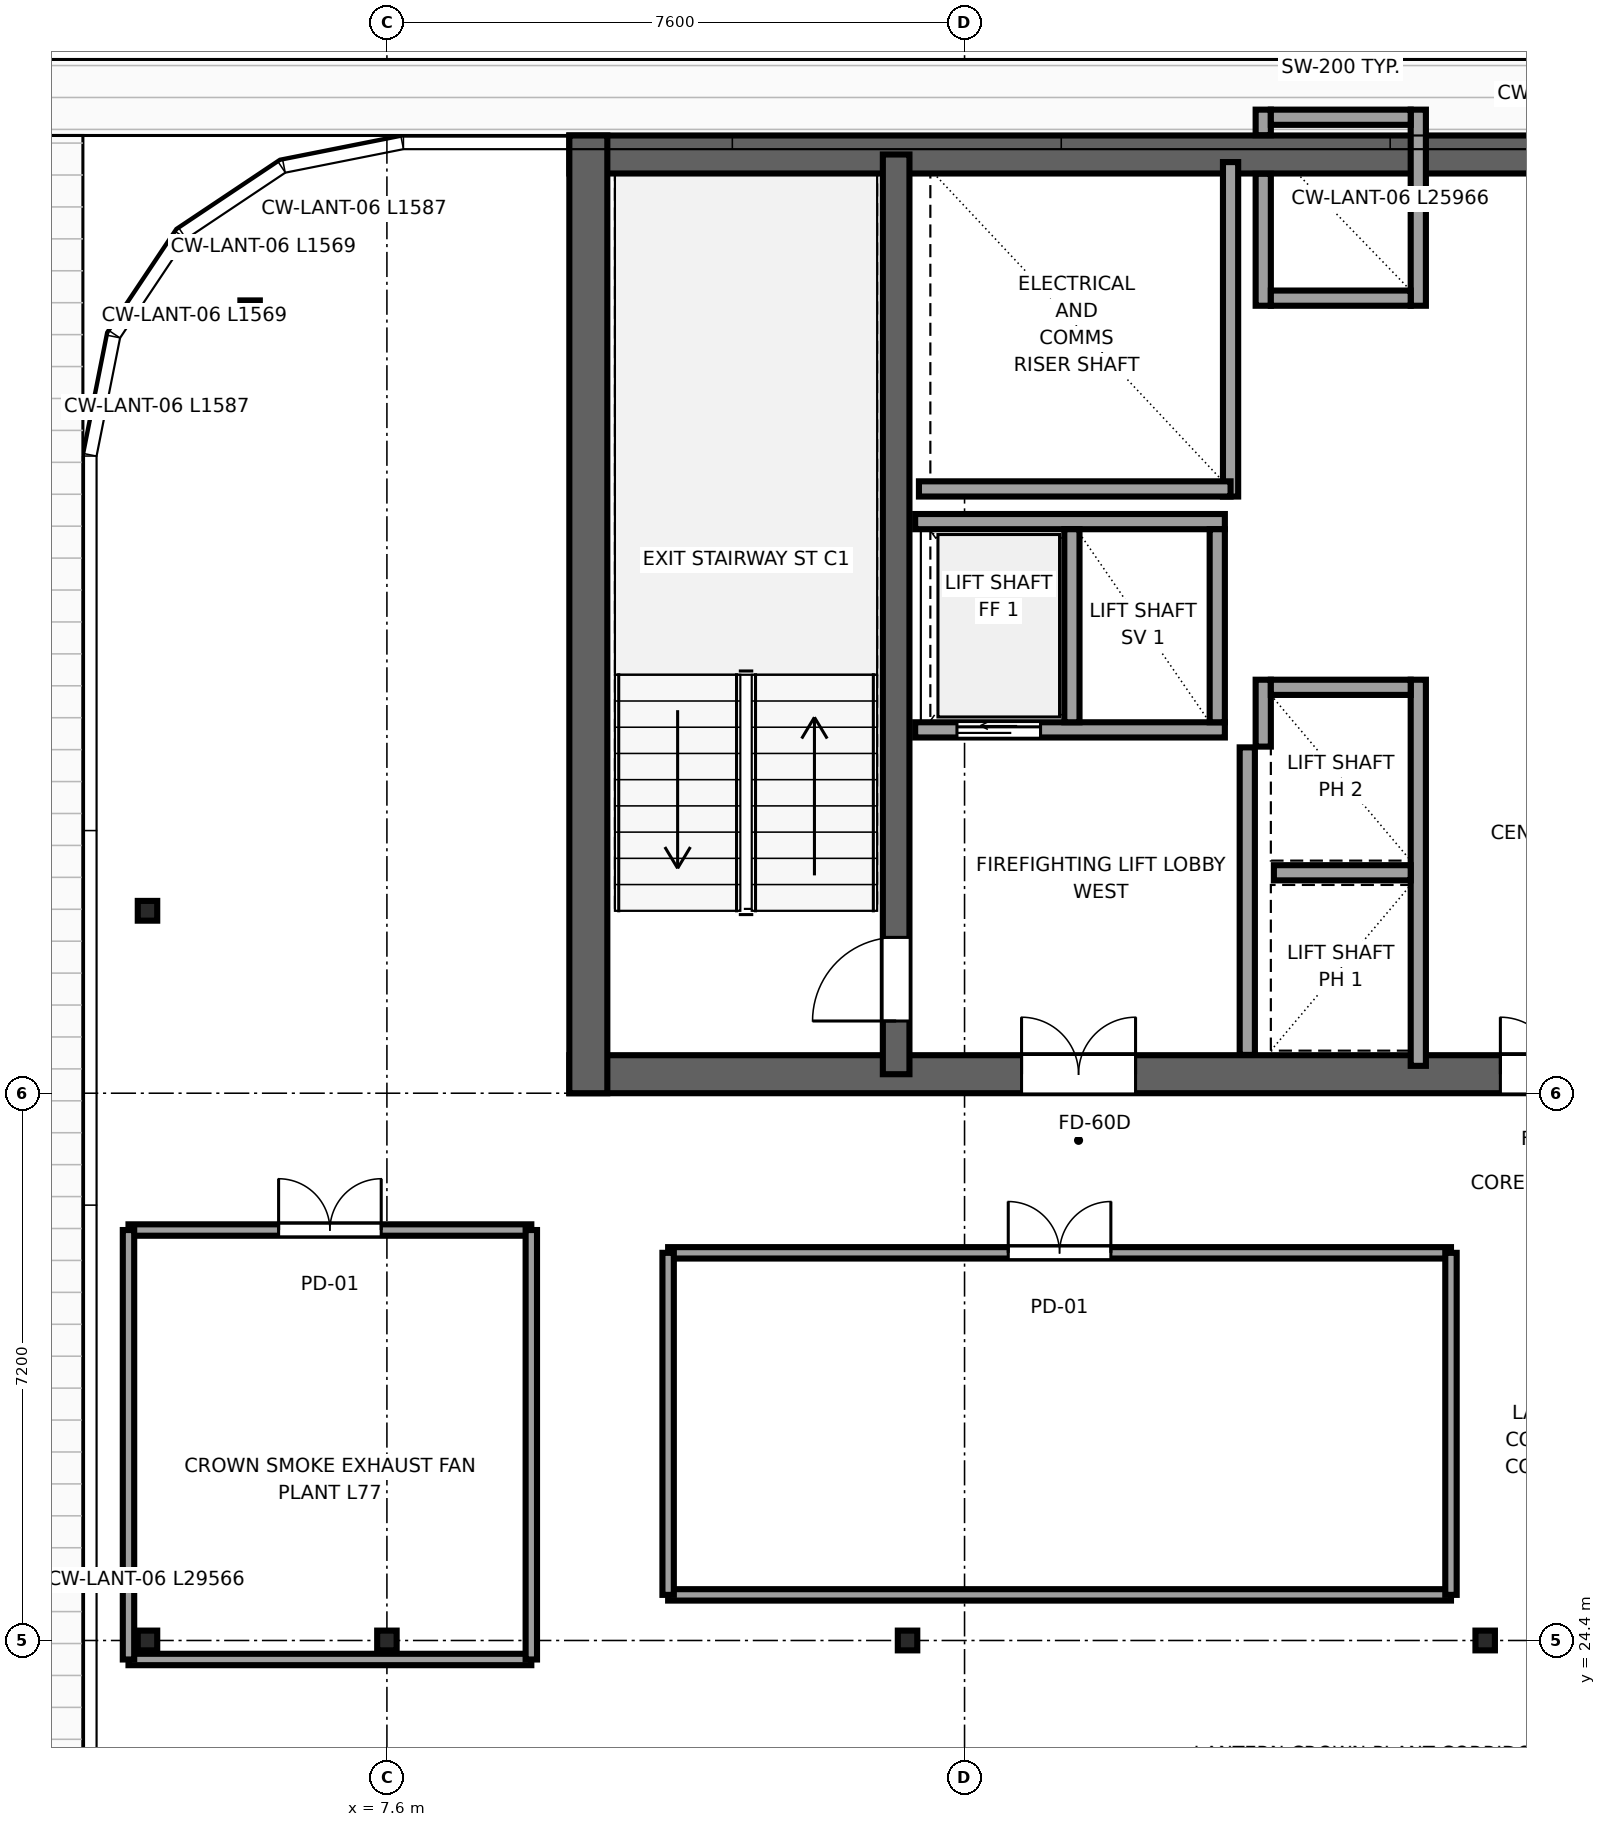
"""IFC4 building model, lengths in metres.
Left out: names, types, materials, properties, quantities, classifications, styles, units other than length and angle.
Written with IfcOpenShell. Run it as: python <this file> out.ifc"""

import sys

from ifc_helpers import new_model, si_unit, direction, frame, frame_2d, origin, origin_2d, place, context, subcontext, project, spatial, rectangle, i_section, extrude, source, transform, mapped, element, fill, save


model = new_model("IFC4")
c1 = context("Model", 3, precision=1e-05, world=origin(), true_north=direction((0.0, 1.0)))
c2 = subcontext(c1, "Body", "Model", "MODEL_VIEW")
j1 = project(units=[si_unit("LENGTHUNIT", "METRE"), si_unit("PLANEANGLEUNIT", "RADIAN")], contexts=[c1])
p1 = place(None, origin())
s1 = spatial("IfcSite", under=j1, at=p1, CompositionType="ELEMENT")
p2 = place(p1, origin())
s2 = spatial("IfcBuilding", under=s1, at=p2, CompositionType="ELEMENT")
p3 = place(p2, frame((0.0, 0.0, 290.95)))
s3 = spatial("IfcBuildingStorey", under=s2, at=p3, CompositionType="ELEMENT", Elevation=290.95)
p4 = place(p3, frame((10.0, 31.85, 0.0), z_axis=(0.0, 0.0, 1.0), x_axis=(1.0, 0.0, 0.0)))
e1 = element("IfcWall", 1, at=p4, inside=s3, PredefinedType="SHEAR", context=c2, shape_type="SweptSolid", body=[
    extrude(rectangle(XDim=26.0, YDim=0.5, at=frame_2d((13.0, 0.0))), origin(), (0.0, 0.0, 1.0), 3.8),
])
p5 = place(p4, frame((7.45, 0.0, 0.0), z_axis=(0.0, 0.0, 1.0), x_axis=(-1.0, 0.0, 0.0)))
e2 = element("IfcOpeningElement", 2, at=p5, cuts=e1, PredefinedType="OPENING", context=c2, shape_type="SweptSolid", body=[
    extrude(rectangle(XDim=1.5, YDim=2.04, at=frame_2d((0.75, 1.02))), frame((0.0, 0.26, 0.0), z_axis=(0.0, -1.0, 0.0), x_axis=(1.0, 0.0, 0.0)), (0.0, 0.0, 1.0), 0.52),
])
p6 = place(p4, frame((13.75, 0.0, 0.0), z_axis=(0.0, 0.0, 1.0), x_axis=(-1.0, 0.0, 0.0)))
e3 = element("IfcOpeningElement", 3, at=p6, cuts=e1, PredefinedType="OPENING", context=c2, shape_type="SweptSolid", body=[
    extrude(rectangle(XDim=1.5, YDim=2.04, at=frame_2d((0.75, 1.02))), frame((0.0, 0.26, 0.0), z_axis=(0.0, -1.0, 0.0), x_axis=(1.0, 0.0, 0.0)), (0.0, 0.0, 1.0), 0.52),
])
p7 = place(p4, frame((20.05, 0.0, 0.0), z_axis=(0.0, 0.0, 1.0), x_axis=(-1.0, 0.0, 0.0)))
e4 = element("IfcOpeningElement", 4, at=p7, cuts=e1, PredefinedType="OPENING", context=c2, shape_type="SweptSolid", body=[
    extrude(rectangle(XDim=1.5, YDim=2.04, at=frame_2d((0.75, 1.02))), frame((0.0, 0.26, 0.0), z_axis=(0.0, -1.0, 0.0), x_axis=(1.0, 0.0, 0.0)), (0.0, 0.0, 1.0), 0.52),
])
p8 = place(p3, frame((10.0, 43.95, 0.0), z_axis=(0.0, 0.0, 1.0), x_axis=(1.0, 0.0, 0.0)))
e5 = element("IfcWall", 5, at=p8, inside=s3, PredefinedType="SHEAR", context=c2, shape_type="SweptSolid", body=[
    extrude(rectangle(XDim=26.0, YDim=0.5, at=frame_2d((13.0, 0.0))), origin(), (0.0, 0.0, 1.0), 3.8),
])
p9 = place(p3, frame((10.25, 31.6, 0.0), z_axis=(0.0, 0.0, 1.0), x_axis=(0.0, 1.0, 0.0)))
e6 = element("IfcWall", 6, at=p9, inside=s3, PredefinedType="SHEAR", context=c2, shape_type="SweptSolid", body=[
    extrude(rectangle(XDim=12.6, YDim=0.5, at=frame_2d((6.3, 0.0))), origin(), (0.0, 0.0, 1.0), 3.8),
])
p10 = place(p3, frame((14.3, 31.85, 0.0), z_axis=(0.0, 0.0, 1.0), x_axis=(0.0, 1.0, 0.0)))
e7 = element("IfcWall", 7, at=p10, inside=s3, PredefinedType="SHEAR", context=c2, shape_type="SweptSolid", body=[
    extrude(rectangle(XDim=12.1, YDim=0.35, at=frame_2d((6.05, 0.0))), origin(), (0.0, 0.0, 1.0), 3.8),
])
p11 = place(p10, frame((0.7, 0.0, 0.0)))
e8 = element("IfcOpeningElement", 8, at=p11, cuts=e7, PredefinedType="OPENING", context=c2, shape_type="SweptSolid", body=[
    extrude(rectangle(XDim=1.1, YDim=2.12, at=frame_2d((0.55, 1.06))), frame((0.0, 0.185, 0.0), z_axis=(0.0, -1.0, 0.0), x_axis=(1.0, 0.0, 0.0)), (0.0, 0.0, 1.0), 0.37),
])
m1 = source(origin(), c2, "Body", "SweptSolid", [
    extrude(i_section(OverallWidth=0.256, OverallDepth=0.26, WebThickness=0.01, FlangeThickness=0.017, FilletRadius=0.014, at=origin_2d()), origin(), (0.0, 0.0, 1.0), 3.8),
])
for number, where, z_axis, x_axis in (
    (9, (4.45, 24.4, 0.0), (0.0, 0.0, 1.0), (1.0, 0.0, 0.0)),
    (10, (7.6, 24.4, 0.0), (0.0, 0.0, 1.0), (1.0, 0.0, 0.0)),
    (11, (14.45, 24.4, 0.0), (0.0, 0.0, 1.0), (1.0, 0.0, 0.0)),
    (12, (22.05, 24.4, 0.0), (0.0, 0.0, 1.0), (1.0, 0.0, 0.0)),
    (13, (5.8, 41.9, 0.0), (0.0, 0.0, 1.0), (1.0, 0.0, 0.0)),
    (14, (4.45, 34.0, 0.0), (0.0, 0.0, 1.0), (1.0, 0.0, 0.0)),
):
    element("IfcColumn", number, at=place(p3, frame(where, z_axis=z_axis, x_axis=x_axis)), inside=s3, PredefinedType="COLUMN", context=c2, shape_type="MappedRepresentation", body=[
        mapped(m1, transform((0.0, 0.0, 0.0), x_axis=(1.0, 0.0, 0.0), y_axis=(0.0, 1.0, 0.0), z_axis=(0.0, 0.0, 1.0), scale=1.0)),
    ])
p12 = place(p3, frame((18.7, 39.45, 0.0), z_axis=(0.0, 0.0, 1.0), x_axis=(0.0, 1.0, 0.0)))
e15 = element("IfcWall", 15, at=p12, inside=s3, PredefinedType="SOLIDWALL", context=c2, shape_type="SweptSolid", body=[
    extrude(rectangle(XDim=4.4, YDim=0.2, at=frame_2d((2.2, 0.0))), origin(), (0.0, 0.0, 1.0), 3.58),
])
p13 = place(p3, frame((14.6, 39.55, 0.0), z_axis=(0.0, 0.0, 1.0), x_axis=(1.0, 0.0, 0.0)))
e16 = element("IfcWall", 16, at=p13, inside=s3, PredefinedType="SOLIDWALL", context=c2, shape_type="SweptSolid", body=[
    extrude(rectangle(XDim=4.1, YDim=0.2, at=frame_2d((2.05, 0.0))), origin(), (0.0, 0.0, 1.0), 3.58),
])
p14 = place(p3, frame((18.92, 32.104, 0.0), z_axis=(0.0, 0.0, 1.0), x_axis=(0.0, 1.0, 0.0)))
e17 = element("IfcWall", 17, at=p14, inside=s3, PredefinedType="SOLIDWALL", context=c2, shape_type="SweptSolid", body=[
    extrude(rectangle(XDim=4.046, YDim=0.2, at=frame_2d((2.023, 0.0))), origin(), (0.0, 0.0, 1.0), 3.58),
])
p15 = place(p3, frame((21.17, 31.96, 0.0), z_axis=(0.0, 0.0, 1.0), x_axis=(0.0, 1.0, 0.0)))
e18 = element("IfcWall", 18, at=p15, inside=s3, PredefinedType="SOLIDWALL", context=c2, shape_type="SweptSolid", body=[
    extrude(rectangle(XDim=5.08, YDim=0.2, at=frame_2d((2.54, 0.0))), origin(), (0.0, 0.0, 1.0), 3.58),
])
p16 = place(p3, frame((19.13, 36.16, 0.0), z_axis=(0.0, 0.0, 1.0), x_axis=(0.0, 1.0, 0.0)))
e19 = element("IfcWall", 19, at=p16, inside=s3, PredefinedType="SOLIDWALL", context=c2, shape_type="SweptSolid", body=[
    extrude(rectangle(XDim=0.88, YDim=0.2, at=frame_2d((0.44, 0.0))), origin(), (0.0, 0.0, 1.0), 3.58),
])
p17 = place(p3, frame((19.23, 36.94, 0.0), z_axis=(0.0, 0.0, 1.0), x_axis=(1.0, 0.0, 0.0)))
e20 = element("IfcWall", 20, at=p17, inside=s3, PredefinedType="SOLIDWALL", context=c2, shape_type="SweptSolid", body=[
    extrude(rectangle(XDim=1.84, YDim=0.2, at=frame_2d((0.92, 0.0))), origin(), (0.0, 0.0, 1.0), 3.58),
])
p18 = place(p3, frame((19.27, 34.5, 0.0), z_axis=(0.0, 0.0, 1.0), x_axis=(1.0, 0.0, 0.0)))
e21 = element("IfcWall", 21, at=p18, inside=s3, PredefinedType="SOLIDWALL", context=c2, shape_type="SweptSolid", body=[
    extrude(rectangle(XDim=1.8, YDim=0.2, at=frame_2d((0.9, 0.0))), origin(), (0.0, 0.0, 1.0), 3.58),
])
p19 = place(p3, frame((21.17, 41.96, 0.0), z_axis=(0.0, 0.0, 1.0), x_axis=(0.0, 1.0, 0.0)))
e22 = element("IfcWall", 22, at=p19, inside=s3, PredefinedType="SOLIDWALL", context=c2, shape_type="SweptSolid", body=[
    extrude(rectangle(XDim=2.58, YDim=0.2, at=frame_2d((1.29, 0.0))), origin(), (0.0, 0.0, 1.0), 3.58),
])
p20 = place(p3, frame((19.13, 41.96, 0.0), z_axis=(0.0, 0.0, 1.0), x_axis=(0.0, 1.0, 0.0)))
e23 = element("IfcWall", 23, at=p20, inside=s3, PredefinedType="SOLIDWALL", context=c2, shape_type="SweptSolid", body=[
    extrude(rectangle(XDim=1.736, YDim=0.2, at=frame_2d((0.868, 0.0))), origin(), (0.0, 0.0, 1.0), 3.58),
])
p21 = place(p3, frame((19.13, 44.204, 0.0), z_axis=(0.0, 0.0, 1.0), x_axis=(0.0, 1.0, 0.0)))
e24 = element("IfcWall", 24, at=p21, inside=s3, PredefinedType="SOLIDWALL", context=c2, shape_type="SweptSolid", body=[
    extrude(rectangle(XDim=0.336, YDim=0.2, at=frame_2d((0.168, 0.0))), origin(), (0.0, 0.0, 1.0), 3.58),
])
for number, where, z_axis, x_axis in (
    (25, (19.23, 42.06, 0.0), (0.0, 0.0, 1.0), (1.0, 0.0, 0.0)),
    (26, (19.23, 44.44, 0.0), (0.0, 0.0, 1.0), (1.0, 0.0, 0.0)),
):
    element("IfcWall", number, at=place(p3, frame(where, z_axis=z_axis, x_axis=x_axis)), inside=s3, PredefinedType="SOLIDWALL", context=c2, shape_type="SweptSolid", body=[
        extrude(rectangle(XDim=1.84, YDim=0.2, at=frame_2d((0.92, 0.0))), origin(), (0.0, 0.0, 1.0), 3.58),
    ])
p22 = place(p3, frame((14.55, 36.38, 0.0), z_axis=(0.0, 0.0, 1.0), x_axis=(1.0, 0.0, 0.0)))
e27 = element("IfcWall", 27, at=p22, inside=s3, PredefinedType="SOLIDWALL", context=c2, shape_type="SweptSolid", body=[
    extrude(rectangle(XDim=4.075, YDim=0.2, at=frame_2d((2.038, 0.0))), origin(), (0.0, 0.0, 1.0), 3.58),
])
p23 = place(p22, frame((0.55, 0.0, 0.0)))
e28 = element("IfcOpeningElement", 28, at=p23, cuts=e27, PredefinedType="OPENING", context=c2, shape_type="SweptSolid", body=[
    extrude(rectangle(XDim=1.1, YDim=2.12, at=frame_2d((0.55, 1.06))), frame((0.0, 0.11, 0.0), z_axis=(0.0, -1.0, 0.0), x_axis=(1.0, 0.0, 0.0)), (0.0, 0.0, 1.0), 0.22),
])
p24 = place(p3, frame((14.55, 39.12, 0.0), z_axis=(0.0, 0.0, 1.0), x_axis=(1.0, 0.0, 0.0)))
e29 = element("IfcWall", 29, at=p24, inside=s3, PredefinedType="SOLIDWALL", context=c2, shape_type="SweptSolid", body=[
    extrude(rectangle(XDim=4.075, YDim=0.2, at=frame_2d((2.038, 0.0))), origin(), (0.0, 0.0, 1.0), 3.58),
])
for number, where, z_axis, x_axis in (
    (30, (18.525, 36.48, 0.0), (0.0, 0.0, 1.0), (0.0, 1.0, 0.0)),
    (31, (16.613, 36.48, 0.0), (0.0, 0.0, 1.0), (0.0, 1.0, 0.0)),
):
    element("IfcWall", number, at=place(p3, frame(where, z_axis=z_axis, x_axis=x_axis)), inside=s3, PredefinedType="SOLIDWALL", context=c2, shape_type="SweptSolid", body=[
        extrude(rectangle(XDim=2.54, YDim=0.2, at=frame_2d((1.27, 0.0))), origin(), (0.0, 0.0, 1.0), 3.58),
    ])
p25 = place(p3, frame((4.2, 24.15, 0.0), z_axis=(0.0, 0.0, 1.0), x_axis=(1.0, 0.0, 0.0)))
e32 = element("IfcWall", 32, at=p25, inside=s3, PredefinedType="PARTITIONING", context=c2, shape_type="SweptSolid", body=[
    extrude(rectangle(XDim=5.3, YDim=0.15, at=frame_2d((2.65, 0.0))), origin(), (0.0, 0.0, 1.0), 2.37),
])
p26 = place(p3, frame((4.2, 29.8, 0.0), z_axis=(0.0, 0.0, 1.0), x_axis=(1.0, 0.0, 0.0)))
e33 = element("IfcWall", 33, at=p26, inside=s3, PredefinedType="PARTITIONING", context=c2, shape_type="SweptSolid", body=[
    extrude(rectangle(XDim=5.3, YDim=0.15, at=frame_2d((2.65, 0.0))), origin(), (0.0, 0.0, 1.0), 3.58),
])
p27 = place(p26, frame((1.975, 0.0, 0.0)))
e34 = element("IfcOpeningElement", 34, at=p27, cuts=e33, PredefinedType="OPENING", context=c2, shape_type="SweptSolid", body=[
    extrude(rectangle(XDim=1.35, YDim=2.15, at=frame_2d((0.675, 1.075))), frame((0.0, 0.085, 0.0), z_axis=(0.0, -1.0, 0.0), x_axis=(1.0, 0.0, 0.0)), (0.0, 0.0, 1.0), 0.17),
])
p28 = place(p3, frame((4.2, 24.15, 0.0), z_axis=(0.0, 0.0, 1.0), x_axis=(0.0, 1.0, 0.0)))
e35 = element("IfcWall", 35, at=p28, inside=s3, PredefinedType="PARTITIONING", context=c2, shape_type="SweptSolid", body=[
    extrude(rectangle(XDim=5.65, YDim=0.15, at=frame_2d((2.825, 0.0))), origin(), (0.0, 0.0, 1.0), 2.37),
])
p29 = place(p3, frame((9.5, 24.15, 0.0), z_axis=(0.0, 0.0, 1.0), x_axis=(0.0, 1.0, 0.0)))
e36 = element("IfcWall", 36, at=p29, inside=s3, PredefinedType="PARTITIONING", context=c2, shape_type="SweptSolid", body=[
    extrude(rectangle(XDim=5.65, YDim=0.15, at=frame_2d((2.825, 0.0))), origin(), (0.0, 0.0, 1.0), 3.58),
])
p30 = place(p3, frame((11.3, 25.0, 0.0), z_axis=(0.0, 0.0, 1.0), x_axis=(1.0, 0.0, 0.0)))
e37 = element("IfcWall", 37, at=p30, inside=s3, PredefinedType="PARTITIONING", context=c2, shape_type="SweptSolid", body=[
    extrude(rectangle(XDim=10.3, YDim=0.15, at=frame_2d((5.15, 0.0))), origin(), (0.0, 0.0, 1.0), 3.58),
])
p31 = place(p3, frame((11.3, 29.5, 0.0), z_axis=(0.0, 0.0, 1.0), x_axis=(1.0, 0.0, 0.0)))
e38 = element("IfcWall", 38, at=p31, inside=s3, PredefinedType="PARTITIONING", context=c2, shape_type="SweptSolid", body=[
    extrude(rectangle(XDim=10.3, YDim=0.15, at=frame_2d((5.15, 0.0))), origin(), (0.0, 0.0, 1.0), 3.58),
])
p32 = place(p31, frame((4.475, 0.0, 0.0)))
e39 = element("IfcOpeningElement", 39, at=p32, cuts=e38, PredefinedType="OPENING", context=c2, shape_type="SweptSolid", body=[
    extrude(rectangle(XDim=1.35, YDim=2.15, at=frame_2d((0.675, 1.075))), frame((0.0, 0.085, 0.0), z_axis=(0.0, -1.0, 0.0), x_axis=(1.0, 0.0, 0.0)), (0.0, 0.0, 1.0), 0.17),
])
p33 = place(p3, frame((11.3, 25.0, 0.0), z_axis=(0.0, 0.0, 1.0), x_axis=(0.0, 1.0, 0.0)))
e40 = element("IfcWall", 40, at=p33, inside=s3, PredefinedType="PARTITIONING", context=c2, shape_type="SweptSolid", body=[
    extrude(rectangle(XDim=4.5, YDim=0.15, at=frame_2d((2.25, 0.0))), origin(), (0.0, 0.0, 1.0), 3.314),
])
p34 = place(p3, frame((21.6, 25.0, 0.0), z_axis=(0.0, 0.0, 1.0), x_axis=(0.0, 1.0, 0.0)))
e41 = element("IfcWall", 41, at=p34, inside=s3, PredefinedType="PARTITIONING", context=c2, shape_type="SweptSolid", body=[
    extrude(rectangle(XDim=4.5, YDim=0.15, at=frame_2d((2.25, 0.0))), origin(), (0.0, 0.0, 1.0), 3.58),
])
m2 = source(origin(), c2, "Body", "SweptSolid", [
    extrude(rectangle(XDim=1.1, YDim=2.12, at=frame_2d((0.55, 1.06))), frame((0.0, 0.025, 0.0), z_axis=(0.0, -1.0, 0.0), x_axis=(1.0, 0.0, 0.0)), (0.0, 0.0, 1.0), 0.05),
])
p35 = place(p11, origin())
e42 = element("IfcDoor", 42, at=p35, inside=s3, OperationType="SINGLE_SWING_LEFT", PredefinedType="DOOR", context=c2, shape_type="MappedRepresentation", body=[
    mapped(m2, transform((0.0, 0.0, 0.0), x_axis=(1.0, 0.0, 0.0), y_axis=(0.0, 1.0, 0.0), z_axis=(0.0, 0.0, 1.0), scale=1.0)),
])
fill(e8, e42)
m3 = source(origin(), c2, "Body", "SweptSolid", [
    extrude(rectangle(XDim=1.5, YDim=2.04, at=frame_2d((0.75, 1.02))), frame((0.0, 0.025, 0.0), z_axis=(0.0, -1.0, 0.0), x_axis=(1.0, 0.0, 0.0)), (0.0, 0.0, 1.0), 0.05),
])
p36 = place(p5, origin())
e43 = element("IfcDoor", 43, at=p36, inside=s3, OperationType="DOUBLE_DOOR_SINGLE_SWING", PredefinedType="DOOR", context=c2, shape_type="MappedRepresentation", body=[
    mapped(m3, transform((0.0, 0.0, 0.0), x_axis=(1.0, 0.0, 0.0), y_axis=(0.0, 1.0, 0.0), z_axis=(0.0, 0.0, 1.0), scale=1.0)),
])
fill(e2, e43)
p37 = place(p6, origin())
e44 = element("IfcDoor", 44, at=p37, inside=s3, OperationType="DOUBLE_DOOR_SINGLE_SWING", PredefinedType="DOOR", context=c2, shape_type="MappedRepresentation", body=[
    mapped(m3, transform((0.0, 0.0, 0.0), x_axis=(1.0, 0.0, 0.0), y_axis=(0.0, 1.0, 0.0), z_axis=(0.0, 0.0, 1.0), scale=1.0)),
])
fill(e3, e44)
m4 = source(origin(), c2, "Body", "SweptSolid", [
    extrude(rectangle(XDim=1.1, YDim=2.12, at=frame_2d((0.55, 1.06))), frame((0.0, 0.025, 0.0), z_axis=(0.0, -1.0, 0.0), x_axis=(1.0, 0.0, 0.0)), (0.0, 0.0, 1.0), 0.05),
])
p38 = place(p23, origin())
e45 = element("IfcDoor", 45, at=p38, inside=s3, OperationType="SLIDING_TO_LEFT", PredefinedType="DOOR", context=c2, shape_type="MappedRepresentation", body=[
    mapped(m4, transform((0.0, 0.0, 0.0), x_axis=(1.0, 0.0, 0.0), y_axis=(0.0, 1.0, 0.0), z_axis=(0.0, 0.0, 1.0), scale=1.0)),
])
fill(e28, e45)
m5 = source(origin(), c2, "Body", "SweptSolid", [
    extrude(rectangle(XDim=1.35, YDim=2.15, at=frame_2d((0.675, 1.075))), frame((0.0, 0.025, 0.0), z_axis=(0.0, -1.0, 0.0), x_axis=(1.0, 0.0, 0.0)), (0.0, 0.0, 1.0), 0.05),
])
p39 = place(p27, origin())
e46 = element("IfcDoor", 46, at=p39, inside=s3, OperationType="DOUBLE_DOOR_SINGLE_SWING", PredefinedType="DOOR", context=c2, shape_type="MappedRepresentation", body=[
    mapped(m5, transform((0.0, 0.0, 0.0), x_axis=(1.0, 0.0, 0.0), y_axis=(0.0, 1.0, 0.0), z_axis=(0.0, 0.0, 1.0), scale=1.0)),
])
fill(e34, e46)
p40 = place(p32, origin())
e47 = element("IfcDoor", 47, at=p40, inside=s3, OperationType="DOUBLE_DOOR_SINGLE_SWING", PredefinedType="DOOR", context=c2, shape_type="MappedRepresentation", body=[
    mapped(m5, transform((0.0, 0.0, 0.0), x_axis=(1.0, 0.0, 0.0), y_axis=(0.0, 1.0, 0.0), z_axis=(0.0, 0.0, 1.0), scale=1.0)),
])
fill(e39, e47)
save(model, sys.argv[1])
